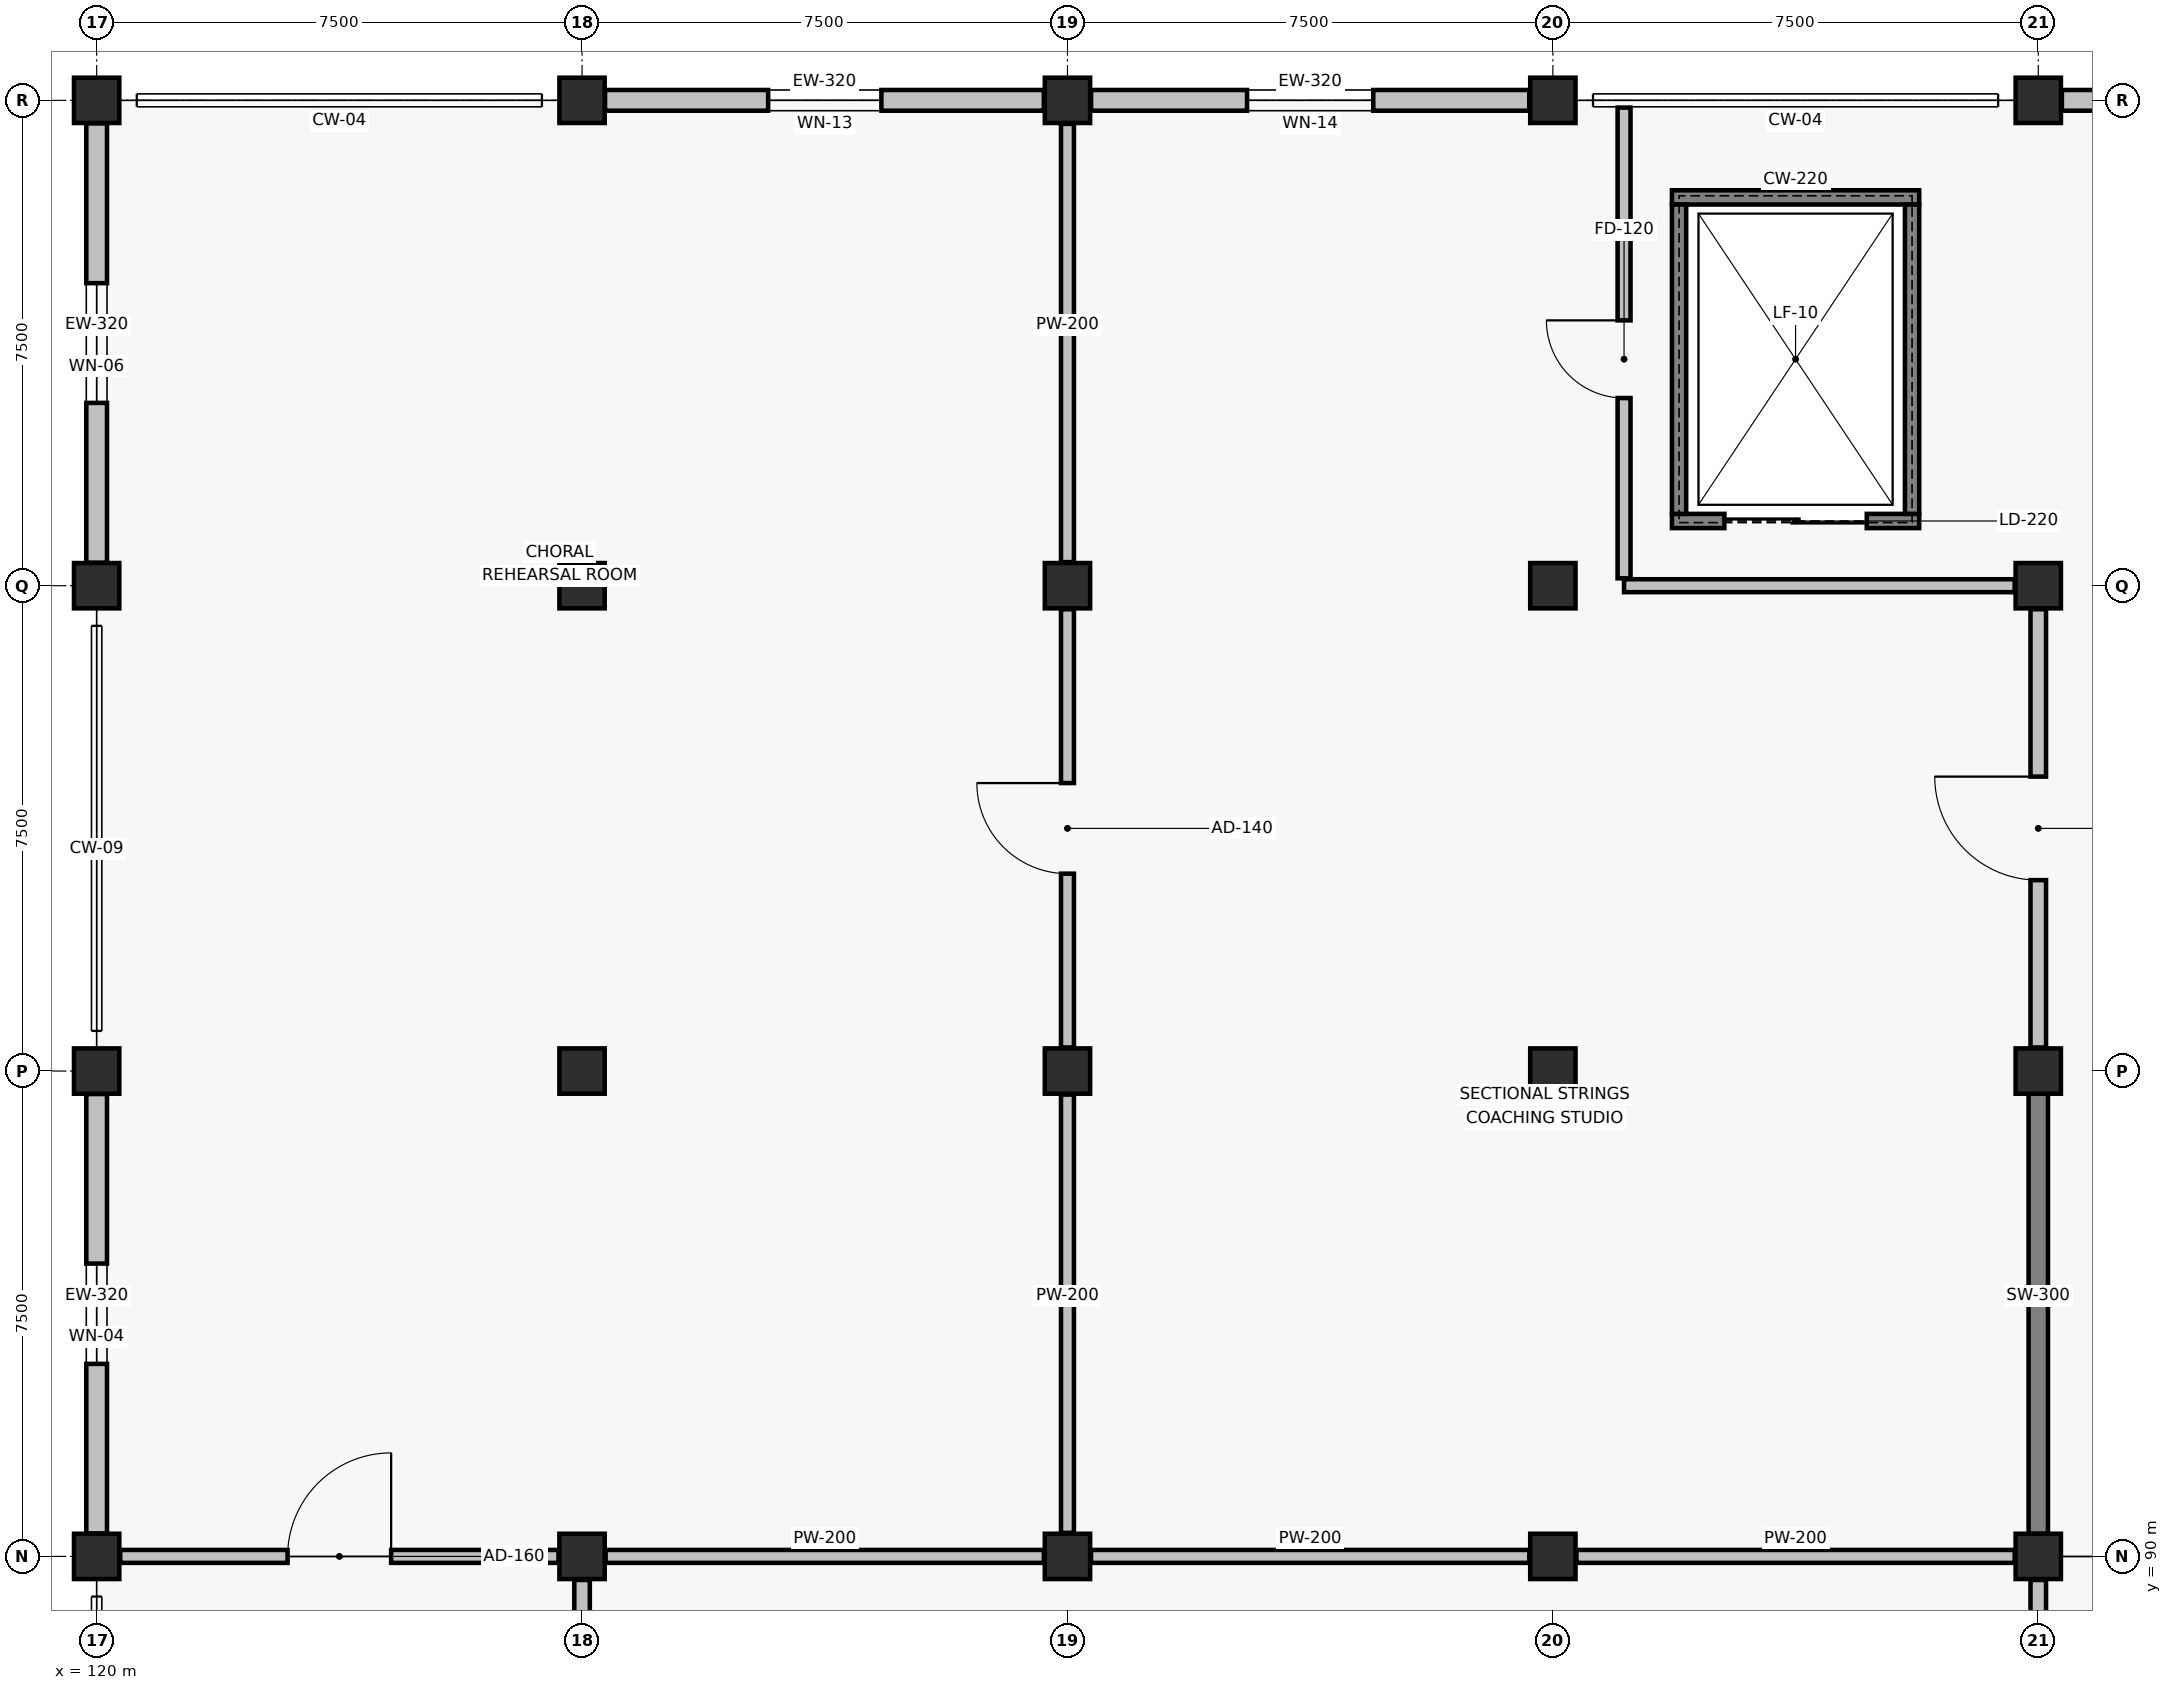
"""IFC4 building model, lengths in metres.
Left out: names, types, materials, properties, quantities, classifications, styles, units other than length and angle.
Written with IfcOpenShell. Run it as: python <this file> out.ifc"""

import sys

from ifc_helpers import new_model, si_unit, direction, frame, frame_2d, origin, origin_2d, place, context, subcontext, project, spatial, rectangle, extrude, element, fill, save


model = new_model("IFC4")
c1 = context("Model", 3, precision=1e-05, world=origin(), true_north=direction((0.0, 1.0)))
c2 = subcontext(c1, "Body", "Model", "MODEL_VIEW")
j1 = project(units=[si_unit("LENGTHUNIT", "METRE"), si_unit("PLANEANGLEUNIT", "RADIAN")], contexts=[c1])
p1 = place(None, origin())
s1 = spatial("IfcSite", under=j1, at=p1, CompositionType="ELEMENT")
p2 = place(p1, origin())
s2 = spatial("IfcBuilding", under=s1, at=p2, CompositionType="ELEMENT")
p3 = place(p2, frame((0.0, 0.0, 4.8)))
s3 = spatial("IfcBuildingStorey", under=s2, at=p3, CompositionType="ELEMENT", Elevation=4.8)
for number, where, z_axis, x_axis in (
    (1, (120.0, 90.0, 0.0), (0.0, 0.0, 1.0), (1.0, 0.0, 0.0)),
    (2, (120.0, 97.5, 0.0), (0.0, 0.0, 1.0), (1.0, 0.0, 0.0)),
    (3, (120.0, 105.0, 0.0), (0.0, 0.0, 1.0), (1.0, 0.0, 0.0)),
    (4, (120.0, 112.5, 0.0), (0.0, 0.0, 1.0), (1.0, 0.0, 0.0)),
    (5, (127.5, 90.0, 0.0), (0.0, 0.0, 1.0), (1.0, 0.0, 0.0)),
    (6, (127.5, 97.5, 0.0), (0.0, 0.0, 1.0), (1.0, 0.0, 0.0)),
    (7, (127.5, 105.0, 0.0), (0.0, 0.0, 1.0), (1.0, 0.0, 0.0)),
    (8, (127.5, 112.5, 0.0), (0.0, 0.0, 1.0), (1.0, 0.0, 0.0)),
    (9, (135.0, 90.0, 0.0), (0.0, 0.0, 1.0), (1.0, 0.0, 0.0)),
    (10, (135.0, 97.5, 0.0), (0.0, 0.0, 1.0), (1.0, 0.0, 0.0)),
    (11, (135.0, 105.0, 0.0), (0.0, 0.0, 1.0), (1.0, 0.0, 0.0)),
    (12, (135.0, 112.5, 0.0), (0.0, 0.0, 1.0), (1.0, 0.0, 0.0)),
    (13, (142.5, 90.0, 0.0), (0.0, 0.0, 1.0), (1.0, 0.0, 0.0)),
    (14, (142.5, 97.5, 0.0), (0.0, 0.0, 1.0), (1.0, 0.0, 0.0)),
    (15, (142.5, 105.0, 0.0), (0.0, 0.0, 1.0), (1.0, 0.0, 0.0)),
    (16, (142.5, 112.5, 0.0), (0.0, 0.0, 1.0), (1.0, 0.0, 0.0)),
    (17, (150.0, 90.0, 0.0), (0.0, 0.0, 1.0), (1.0, 0.0, 0.0)),
    (18, (150.0, 97.5, 0.0), (0.0, 0.0, 1.0), (1.0, 0.0, 0.0)),
    (19, (150.0, 105.0, 0.0), (0.0, 0.0, 1.0), (1.0, 0.0, 0.0)),
    (20, (150.0, 112.5, 0.0), (0.0, 0.0, 1.0), (1.0, 0.0, 0.0)),
):
    element("IfcColumn", number, at=place(p3, frame(where, z_axis=z_axis, x_axis=x_axis)), inside=s3, PredefinedType="COLUMN", context=c2, shape_type="SweptSolid", body=[
        extrude(rectangle(XDim=0.7, YDim=0.7, at=origin_2d()), origin(), (0.0, 0.0, 1.0), 4.2),
    ])
p4 = place(p3, frame((150.0, 90.35, 0.0), z_axis=(0.0, 0.0, 1.0), x_axis=(0.0, 1.0, 0.0)))
e21 = element("IfcWall", 21, at=p4, inside=s3, PredefinedType="SHEAR", context=c2, shape_type="SweptSolid", body=[
    extrude(rectangle(XDim=6.8, YDim=0.3, at=frame_2d((3.4, 0.0))), origin(), (0.0, 0.0, 1.0), 3.9),
])
p5 = place(p3, frame((127.855, 112.5, 0.0), z_axis=(0.0, 0.0, 1.0), x_axis=(1.0, 0.0, 0.0)))
e22 = element("IfcWall", 22, at=p5, inside=s3, PredefinedType="SOLIDWALL", context=c2, shape_type="SweptSolid", body=[
    extrude(rectangle(XDim=6.78, YDim=0.32, at=frame_2d((3.39, 0.0))), origin(), (0.0, 0.0, 1.0), 3.14),
])
p6 = place(p5, frame((2.52, 0.0, 0.6)))
e23 = element("IfcOpeningElement", 23, at=p6, cuts=e22, PredefinedType="OPENING", context=c2, shape_type="SweptSolid", body=[
    extrude(rectangle(XDim=1.75, YDim=1.3, at=frame_2d((0.875, 0.65))), frame((0.0, 0.17, 0.0), z_axis=(0.0, -1.0, 0.0), x_axis=(1.0, 0.0, 0.0)), (0.0, 0.0, 1.0), 0.34),
])
p7 = place(p3, frame((135.365, 112.5, 0.0), z_axis=(0.0, 0.0, 1.0), x_axis=(1.0, 0.0, 0.0)))
e24 = element("IfcWall", 24, at=p7, inside=s3, PredefinedType="SOLIDWALL", context=c2, shape_type="SweptSolid", body=[
    extrude(rectangle(XDim=6.77, YDim=0.32, at=frame_2d((3.385, 0.0))), origin(), (0.0, 0.0, 1.0), 3.14),
])
p8 = place(p7, frame((2.41, 0.0, 0.6)))
e25 = element("IfcOpeningElement", 25, at=p8, cuts=e24, PredefinedType="OPENING", context=c2, shape_type="SweptSolid", body=[
    extrude(rectangle(XDim=1.95, YDim=1.3, at=frame_2d((0.975, 0.65))), frame((0.0, 0.17, 0.0), z_axis=(0.0, -1.0, 0.0), x_axis=(1.0, 0.0, 0.0)), (0.0, 0.0, 1.0), 0.34),
])
p9 = place(p3, frame((150.365, 112.5, 0.0), z_axis=(0.0, 0.0, 1.0), x_axis=(1.0, 0.0, 0.0)))
e26 = element("IfcWall", 26, at=p9, inside=s3, PredefinedType="SOLIDWALL", context=c2, shape_type="SweptSolid", body=[
    extrude(rectangle(XDim=6.77, YDim=0.32, at=frame_2d((3.385, 0.0))), origin(), (0.0, 0.0, 1.0), 3.14),
])
p10 = place(p9, frame((2.235, 0.0, 0.6)))
e27 = element("IfcOpeningElement", 27, at=p10, cuts=e26, PredefinedType="OPENING", context=c2, shape_type="SweptSolid", body=[
    extrude(rectangle(XDim=2.3, YDim=1.3, at=frame_2d((1.15, 0.65))), frame((0.0, 0.17, 0.0), z_axis=(0.0, -1.0, 0.0), x_axis=(1.0, 0.0, 0.0)), (0.0, 0.0, 1.0), 0.34),
])
p11 = place(p3, frame((120.0, 90.355, 0.0), z_axis=(0.0, 0.0, 1.0), x_axis=(0.0, 1.0, 0.0)))
e28 = element("IfcWall", 28, at=p11, inside=s3, PredefinedType="SOLIDWALL", context=c2, shape_type="SweptSolid", body=[
    extrude(rectangle(XDim=6.79, YDim=0.32, at=frame_2d((3.395, 0.0))), origin(), (0.0, 0.0, 1.0), 2.99),
])
p12 = place(p11, frame((2.62, 0.0, 0.6)))
e29 = element("IfcOpeningElement", 29, at=p12, cuts=e28, PredefinedType="OPENING", context=c2, shape_type="SweptSolid", body=[
    extrude(rectangle(XDim=1.55, YDim=1.8, at=frame_2d((0.775, 0.9))), frame((0.0, 0.17, 0.0), z_axis=(0.0, -1.0, 0.0), x_axis=(1.0, 0.0, 0.0)), (0.0, 0.0, 1.0), 0.34),
])
p13 = place(p3, frame((120.0, 105.355, 0.0), z_axis=(0.0, 0.0, 1.0), x_axis=(0.0, 1.0, 0.0)))
e30 = element("IfcWall", 30, at=p13, inside=s3, PredefinedType="SOLIDWALL", context=c2, shape_type="SweptSolid", body=[
    extrude(rectangle(XDim=6.79, YDim=0.32, at=frame_2d((3.395, 0.0))), origin(), (0.0, 0.0, 1.0), 3.04),
])
p14 = place(p13, frame((2.47, 0.0, 0.6)))
e31 = element("IfcOpeningElement", 31, at=p14, cuts=e30, PredefinedType="OPENING", context=c2, shape_type="SweptSolid", body=[
    extrude(rectangle(XDim=1.85, YDim=1.8, at=frame_2d((0.925, 0.9))), frame((0.0, 0.17, 0.0), z_axis=(0.0, -1.0, 0.0), x_axis=(1.0, 0.0, 0.0)), (0.0, 0.0, 1.0), 0.34),
])
p15 = place(p3, frame((144.34, 106.0, 0.0), z_axis=(0.0, 0.0, 1.0), x_axis=(1.0, 0.0, 0.0)))
e32 = element("IfcWall", 32, at=p15, inside=s3, PredefinedType="SOLIDWALL", context=c2, shape_type="SweptSolid", body=[
    extrude(rectangle(XDim=3.82, YDim=0.22, at=frame_2d((1.91, 0.0))), origin(), (0.0, 0.0, 1.0), 3.92),
])
p16 = place(p15, frame((0.81, 0.0, 0.0)))
e33 = element("IfcOpeningElement", 33, at=p16, cuts=e32, PredefinedType="OPENING", context=c2, shape_type="SweptSolid", body=[
    extrude(rectangle(XDim=2.2, YDim=2.35, at=frame_2d((1.1, 1.175))), frame((0.0, 0.12, 0.0), z_axis=(0.0, -1.0, 0.0), x_axis=(1.0, 0.0, 0.0)), (0.0, 0.0, 1.0), 0.24),
])
p17 = place(p3, frame((144.34, 111.0, 0.0), z_axis=(0.0, 0.0, 1.0), x_axis=(1.0, 0.0, 0.0)))
e34 = element("IfcWall", 34, at=p17, inside=s3, PredefinedType="SOLIDWALL", context=c2, shape_type="SweptSolid", body=[
    extrude(rectangle(XDim=3.82, YDim=0.22, at=frame_2d((1.91, 0.0))), origin(), (0.0, 0.0, 1.0), 3.92),
])
for number, where, z_axis, x_axis in (
    (35, (144.45, 106.11, 0.0), (0.0, 0.0, 1.0), (0.0, 1.0, 0.0)),
    (36, (148.05, 106.11, 0.0), (0.0, 0.0, 1.0), (0.0, 1.0, 0.0)),
):
    element("IfcWall", number, at=place(p3, frame(where, z_axis=z_axis, x_axis=x_axis)), inside=s3, PredefinedType="SOLIDWALL", context=c2, shape_type="SweptSolid", body=[
        extrude(rectangle(XDim=4.78, YDim=0.22, at=frame_2d((2.39, 0.0))), origin(), (0.0, 0.0, 1.0), 3.92),
    ])
p18 = place(p3, frame((143.6, 105.0, 0.0), z_axis=(0.0, 0.0, 1.0), x_axis=(1.0, 0.0, 0.0)))
e37 = element("IfcWall", 37, at=p18, inside=s3, PredefinedType="PARTITIONING", context=c2, shape_type="SweptSolid", body=[
    extrude(rectangle(XDim=6.036, YDim=0.2, at=frame_2d((3.018, 0.0))), origin(), (0.0, 0.0, 1.0), 3.04),
])
p19 = place(p3, frame((143.6, 105.114, 0.0), z_axis=(0.0, 0.0, 1.0), x_axis=(0.0, 1.0, 0.0)))
e38 = element("IfcWall", 38, at=p19, inside=s3, PredefinedType="PARTITIONING", context=c2, shape_type="SweptSolid", body=[
    extrude(rectangle(XDim=7.274, YDim=0.2, at=frame_2d((3.637, 0.0))), origin(), (0.0, 0.0, 1.0), 3.04),
])
p20 = place(p19, frame((2.786, 0.0, 0.0)))
e39 = element("IfcOpeningElement", 39, at=p20, cuts=e38, PredefinedType="OPENING", context=c2, shape_type="SweptSolid", body=[
    extrude(rectangle(XDim=1.2, YDim=2.15, at=frame_2d((0.6, 1.075))), frame((0.0, 0.11, 0.0), z_axis=(0.0, -1.0, 0.0), x_axis=(1.0, 0.0, 0.0)), (0.0, 0.0, 1.0), 0.22),
])
p21 = place(p3, frame((120.364, 90.0, 0.0), z_axis=(0.0, 0.0, 1.0), x_axis=(1.0, 0.0, 0.0)))
e40 = element("IfcWall", 40, at=p21, inside=s3, PredefinedType="PARTITIONING", context=c2, shape_type="SweptSolid", body=[
    extrude(rectangle(XDim=6.772, YDim=0.2, at=frame_2d((3.386, 0.0))), origin(), (0.0, 0.0, 1.0), 2.94),
])
p22 = place(p21, frame((2.586, 0.0, 0.0)))
e41 = element("IfcOpeningElement", 41, at=p22, cuts=e40, PredefinedType="OPENING", context=c2, shape_type="SweptSolid", body=[
    extrude(rectangle(XDim=1.6, YDim=2.16, at=frame_2d((0.8, 1.08))), frame((0.0, 0.11, 0.0), z_axis=(0.0, -1.0, 0.0), x_axis=(1.0, 0.0, 0.0)), (0.0, 0.0, 1.0), 0.22),
])
for number, where, z_axis, x_axis in (
    (42, (127.864, 90.0, 0.0), (0.0, 0.0, 1.0), (1.0, 0.0, 0.0)),
    (43, (135.364, 90.0, 0.0), (0.0, 0.0, 1.0), (1.0, 0.0, 0.0)),
):
    element("IfcWall", number, at=place(p3, frame(where, z_axis=z_axis, x_axis=x_axis)), inside=s3, PredefinedType="PARTITIONING", context=c2, shape_type="SweptSolid", body=[
        extrude(rectangle(XDim=6.772, YDim=0.2, at=frame_2d((3.386, 0.0))), origin(), (0.0, 0.0, 1.0), 2.89),
    ])
p23 = place(p3, frame((142.864, 90.0, 0.0), z_axis=(0.0, 0.0, 1.0), x_axis=(1.0, 0.0, 0.0)))
e44 = element("IfcWall", 44, at=p23, inside=s3, PredefinedType="PARTITIONING", context=c2, shape_type="SweptSolid", body=[
    extrude(rectangle(XDim=6.772, YDim=0.2, at=frame_2d((3.386, 0.0))), origin(), (0.0, 0.0, 1.0), 2.84),
])
p24 = place(p3, frame((127.5, 82.864, 0.0), z_axis=(0.0, 0.0, 1.0), x_axis=(0.0, 1.0, 0.0)))
e45 = element("IfcWall", 45, at=p24, inside=s3, PredefinedType="PARTITIONING", context=c2, shape_type="SweptSolid", body=[
    extrude(rectangle(XDim=6.772, YDim=0.24, at=frame_2d((3.386, 0.0))), origin(), (0.0, 0.0, 1.0), 2.94),
])
p25 = place(p3, frame((135.0, 90.364, 0.0), z_axis=(0.0, 0.0, 1.0), x_axis=(0.0, 1.0, 0.0)))
e46 = element("IfcWall", 46, at=p25, inside=s3, PredefinedType="PARTITIONING", context=c2, shape_type="SweptSolid", body=[
    extrude(rectangle(XDim=6.772, YDim=0.2, at=frame_2d((3.386, 0.0))), origin(), (0.0, 0.0, 1.0), 2.84),
])
p26 = place(p3, frame((135.0, 97.864, 0.0), z_axis=(0.0, 0.0, 1.0), x_axis=(0.0, 1.0, 0.0)))
e47 = element("IfcWall", 47, at=p26, inside=s3, PredefinedType="PARTITIONING", context=c2, shape_type="SweptSolid", body=[
    extrude(rectangle(XDim=6.772, YDim=0.2, at=frame_2d((3.386, 0.0))), origin(), (0.0, 0.0, 1.0), 2.84),
])
p27 = place(p26, frame((2.686, 0.0, 0.0)))
e48 = element("IfcOpeningElement", 48, at=p27, cuts=e47, PredefinedType="OPENING", context=c2, shape_type="SweptSolid", body=[
    extrude(rectangle(XDim=1.4, YDim=2.14, at=frame_2d((0.7, 1.07))), frame((0.0, 0.11, 0.0), z_axis=(0.0, -1.0, 0.0), x_axis=(1.0, 0.0, 0.0)), (0.0, 0.0, 1.0), 0.22),
])
p28 = place(p3, frame((135.0, 105.364, 0.0), z_axis=(0.0, 0.0, 1.0), x_axis=(0.0, 1.0, 0.0)))
e49 = element("IfcWall", 49, at=p28, inside=s3, PredefinedType="PARTITIONING", context=c2, shape_type="SweptSolid", body=[
    extrude(rectangle(XDim=6.772, YDim=0.2, at=frame_2d((3.386, 0.0))), origin(), (0.0, 0.0, 1.0), 2.84),
])
p29 = place(p3, frame((150.0, 82.864, 0.0), z_axis=(0.0, 0.0, 1.0), x_axis=(0.0, 1.0, 0.0)))
e50 = element("IfcWall", 50, at=p29, inside=s3, PredefinedType="PARTITIONING", context=c2, shape_type="SweptSolid", body=[
    extrude(rectangle(XDim=6.772, YDim=0.24, at=frame_2d((3.386, 0.0))), origin(), (0.0, 0.0, 1.0), 2.84),
])
p30 = place(p3, frame((150.0, 97.864, 0.0), z_axis=(0.0, 0.0, 1.0), x_axis=(0.0, 1.0, 0.0)))
e51 = element("IfcWall", 51, at=p30, inside=s3, PredefinedType="PARTITIONING", context=c2, shape_type="SweptSolid", body=[
    extrude(rectangle(XDim=6.772, YDim=0.24, at=frame_2d((3.386, 0.0))), origin(), (0.0, 0.0, 1.0), 2.99),
])
p31 = place(p30, frame((2.586, 0.0, 0.0)))
e52 = element("IfcOpeningElement", 52, at=p31, cuts=e51, PredefinedType="OPENING", context=c2, shape_type="SweptSolid", body=[
    extrude(rectangle(XDim=1.6, YDim=2.16, at=frame_2d((0.8, 1.08))), frame((0.0, 0.13, 0.0), z_axis=(0.0, -1.0, 0.0), x_axis=(1.0, 0.0, 0.0)), (0.0, 0.0, 1.0), 0.26),
])
p32 = place(p6, origin())
e53 = element("IfcWindow", 53, at=p32, inside=s3, PartitioningType="SINGLE_PANEL", PredefinedType="WINDOW", context=c2, shape_type="SweptSolid", body=[
    extrude(rectangle(XDim=1.75, YDim=1.3, at=frame_2d((0.875, 0.65))), frame((0.0, 0.03, 0.0), z_axis=(0.0, -1.0, 0.0), x_axis=(1.0, 0.0, 0.0)), (0.0, 0.0, 1.0), 0.06),
])
fill(e23, e53)
p33 = place(p8, origin())
e54 = element("IfcWindow", 54, at=p33, inside=s3, PartitioningType="SINGLE_PANEL", PredefinedType="WINDOW", context=c2, shape_type="SweptSolid", body=[
    extrude(rectangle(XDim=1.95, YDim=1.3, at=frame_2d((0.975, 0.65))), frame((0.0, 0.03, 0.0), z_axis=(0.0, -1.0, 0.0), x_axis=(1.0, 0.0, 0.0)), (0.0, 0.0, 1.0), 0.06),
])
fill(e25, e54)
p34 = place(p12, origin())
e55 = element("IfcWindow", 55, at=p34, inside=s3, PartitioningType="SINGLE_PANEL", PredefinedType="WINDOW", context=c2, shape_type="SweptSolid", body=[
    extrude(rectangle(XDim=1.55, YDim=1.8, at=frame_2d((0.775, 0.9))), frame((0.0, 0.03, 0.0), z_axis=(0.0, -1.0, 0.0), x_axis=(1.0, 0.0, 0.0)), (0.0, 0.0, 1.0), 0.06),
])
fill(e29, e55)
p35 = place(p14, origin())
e56 = element("IfcWindow", 56, at=p35, inside=s3, PartitioningType="SINGLE_PANEL", PredefinedType="WINDOW", context=c2, shape_type="SweptSolid", body=[
    extrude(rectangle(XDim=1.85, YDim=1.8, at=frame_2d((0.925, 0.9))), frame((0.0, 0.03, 0.0), z_axis=(0.0, -1.0, 0.0), x_axis=(1.0, 0.0, 0.0)), (0.0, 0.0, 1.0), 0.06),
])
fill(e31, e56)
p36 = place(p16, origin())
e57 = element("IfcDoor", 57, at=p36, inside=s3, OperationType="DOUBLE_DOOR_SLIDING", PredefinedType="DOOR", context=c2, shape_type="SweptSolid", body=[
    extrude(rectangle(XDim=2.2, YDim=2.35, at=frame_2d((1.1, 1.175))), frame((0.0, 0.025, 0.0), z_axis=(0.0, -1.0, 0.0), x_axis=(1.0, 0.0, 0.0)), (0.0, 0.0, 1.0), 0.05),
])
fill(e33, e57)
p37 = place(p20, origin())
e58 = element("IfcDoor", 58, at=p37, inside=s3, OperationType="SINGLE_SWING_RIGHT", PredefinedType="DOOR", context=c2, shape_type="SweptSolid", body=[
    extrude(rectangle(XDim=1.2, YDim=2.15, at=frame_2d((0.6, 1.075))), frame((0.0, 0.025, 0.0), z_axis=(0.0, -1.0, 0.0), x_axis=(1.0, 0.0, 0.0)), (0.0, 0.0, 1.0), 0.05),
])
fill(e39, e58)
p38 = place(p22, origin())
e59 = element("IfcDoor", 59, at=p38, inside=s3, OperationType="SINGLE_SWING_RIGHT", PredefinedType="DOOR", context=c2, shape_type="SweptSolid", body=[
    extrude(rectangle(XDim=1.6, YDim=2.16, at=frame_2d((0.8, 1.08))), frame((0.0, 0.025, 0.0), z_axis=(0.0, -1.0, 0.0), x_axis=(1.0, 0.0, 0.0)), (0.0, 0.0, 1.0), 0.05),
])
fill(e41, e59)
p39 = place(p27, origin())
e60 = element("IfcDoor", 60, at=p39, inside=s3, OperationType="SINGLE_SWING_RIGHT", PredefinedType="DOOR", context=c2, shape_type="SweptSolid", body=[
    extrude(rectangle(XDim=1.4, YDim=2.14, at=frame_2d((0.7, 1.07))), frame((0.0, 0.025, 0.0), z_axis=(0.0, -1.0, 0.0), x_axis=(1.0, 0.0, 0.0)), (0.0, 0.0, 1.0), 0.05),
])
fill(e48, e60)
p40 = place(p31, origin())
e61 = element("IfcDoor", 61, at=p40, inside=s3, OperationType="SINGLE_SWING_RIGHT", PredefinedType="DOOR", context=c2, shape_type="SweptSolid", body=[
    extrude(rectangle(XDim=1.6, YDim=2.16, at=frame_2d((0.8, 1.08))), frame((0.0, 0.025, 0.0), z_axis=(0.0, -1.0, 0.0), x_axis=(1.0, 0.0, 0.0)), (0.0, 0.0, 1.0), 0.05),
])
fill(e52, e61)
save(model, sys.argv[1])
